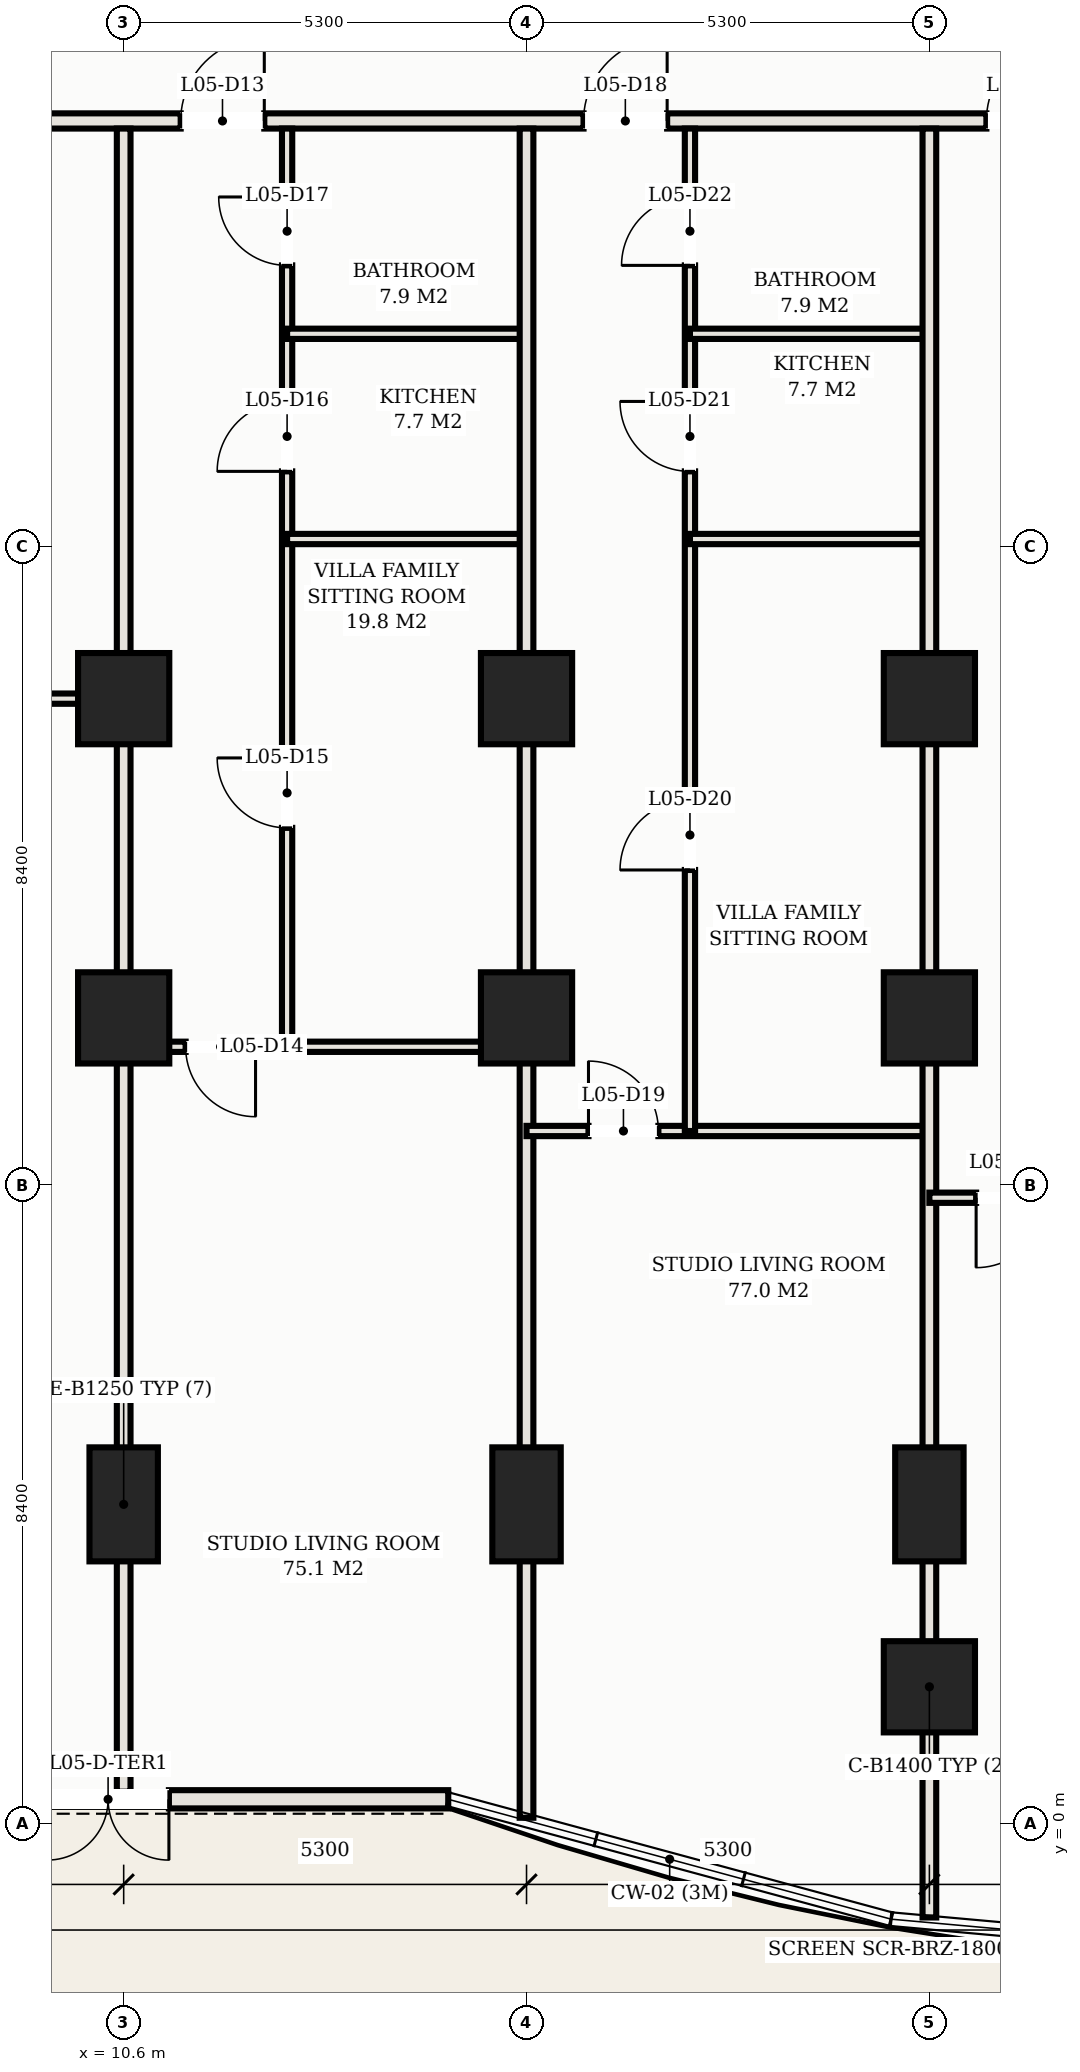
"""IFC4 building model, lengths in metres.
Left out: names, types, materials, properties, quantities, classifications, styles, units other than length and angle.
Written with IfcOpenShell. Run it as: python <this file> out.ifc"""

import sys

from ifc_helpers import new_model, si_unit, direction, frame, frame_2d, origin, origin_2d, place, context, subcontext, project, spatial, rectangle, hollow_rectangle, extrude, element, fill, save


model = new_model("IFC4")
c1 = context("Model", 3, precision=1e-05, world=origin(), true_north=direction((0.0, 1.0)))
c2 = subcontext(c1, "Body", "Model", "MODEL_VIEW")
j1 = project(units=[si_unit("LENGTHUNIT", "METRE"), si_unit("PLANEANGLEUNIT", "RADIAN")], contexts=[c1])
p1 = place(None, origin())
s1 = spatial("IfcSite", under=j1, at=p1, CompositionType="ELEMENT")
p2 = place(p1, origin())
s2 = spatial("IfcBuilding", under=s1, at=p2, CompositionType="ELEMENT")
p3 = place(p2, frame((0.0, 0.0, 24.2)))
s3 = spatial("IfcBuildingStorey", under=s2, at=p3, CompositionType="ELEMENT", Elevation=24.2)
for number, where, z_axis, x_axis in (
    (1, (10.6, 14.8, 0.0), (0.0, 0.0, 1.0), (1.0, 0.0, 0.0)),
    (2, (10.6, 10.6, 0.0), (0.0, 0.0, 1.0), (1.0, 0.0, 0.0)),
    (3, (15.9, 14.8, 0.0), (0.0, 0.0, 1.0), (1.0, 0.0, 0.0)),
    (4, (15.9, 10.6, 0.0), (0.0, 0.0, 1.0), (1.0, 0.0, 0.0)),
    (5, (21.2, 14.8, 0.0), (0.0, 0.0, 1.0), (1.0, 0.0, 0.0)),
    (6, (21.2, 10.6, 0.0), (0.0, 0.0, 1.0), (1.0, 0.0, 0.0)),
    (7, (21.2, 1.8, 0.0), (0.0, 0.0, 1.0), (1.0, 0.0, 0.0)),
):
    element("IfcColumn", number, at=place(p3, frame(where, z_axis=z_axis, x_axis=x_axis)), inside=s3, PredefinedType="COLUMN", context=c2, shape_type="SweptSolid", body=[
        extrude(hollow_rectangle(XDim=1.2, YDim=1.2, WallThickness=0.04, at=origin_2d()), origin(), (0.0, 0.0, 1.0), 3.3),
    ])
for number, where, z_axis, x_axis in (
    (8, (10.6, 4.2, 0.0), (0.0, 0.0, 1.0), (1.0, 0.0, 0.0)),
    (9, (15.9, 4.2, 0.0), (0.0, 0.0, 1.0), (1.0, 0.0, 0.0)),
    (10, (21.2, 4.2, 0.0), (0.0, 0.0, 1.0), (1.0, 0.0, 0.0)),
):
    element("IfcColumn", number, at=place(p3, frame(where, z_axis=z_axis, x_axis=x_axis)), inside=s3, PredefinedType="COLUMN", context=c2, shape_type="SweptSolid", body=[
        extrude(hollow_rectangle(XDim=0.9, YDim=1.5, WallThickness=0.036, at=origin_2d()), origin(), (0.0, 0.0, 1.0), 3.3),
    ])
p4 = place(p3, frame((5.92, 0.32, 0.0), z_axis=(0.0, 0.0, 1.0), x_axis=(1.0, 0.0, 0.0)))
e11 = element("IfcWall", 11, at=p4, inside=s3, PredefinedType="SOLIDWALL", context=c2, shape_type="SweptSolid", body=[
    extrude(rectangle(XDim=8.95, YDim=0.24, at=frame_2d((4.475, 0.0))), origin(), (0.0, 0.0, 1.0), 3.08),
])
p5 = place(p4, frame((3.675, 0.0, 0.0)))
e12 = element("IfcOpeningElement", 12, at=p5, cuts=e11, PredefinedType="OPENING", context=c2, shape_type="SweptSolid", body=[
    extrude(rectangle(XDim=1.6, YDim=2.25, at=frame_2d((0.8, 1.125))), frame((0.0, 0.13, 0.0), z_axis=(0.0, -1.0, 0.0), x_axis=(1.0, 0.0, 0.0)), (0.0, 0.0, 1.0), 0.26),
])
p6 = place(p4, frame((0.45, 0.0, 0.75)))
e13 = element("IfcOpeningElement", 13, at=p6, cuts=e11, PredefinedType="OPENING", context=c2, shape_type="SweptSolid", body=[
    extrude(rectangle(XDim=1.5, YDim=1.6, at=frame_2d((0.75, 0.8))), frame((0.0, 0.13, 0.0), z_axis=(0.0, -1.0, 0.0), x_axis=(1.0, 0.0, 0.0)), (0.0, 0.0, 1.0), 0.26),
])
p7 = place(p3, frame((0.12, 22.4, 0.0), z_axis=(0.0, 0.0, 1.0), x_axis=(1.0, 0.0, 0.0)))
e14 = element("IfcWall", 14, at=p7, inside=s3, PredefinedType="PARTITIONING", context=c2, shape_type="SweptSolid", body=[
    extrude(rectangle(XDim=52.76, YDim=0.2, at=frame_2d((26.38, 0.0))), origin(), (0.0, 0.0, 1.0), 2.57),
])
p8 = place(p7, frame((11.23, 0.0, 0.0)))
e15 = element("IfcOpeningElement", 15, at=p8, cuts=e14, PredefinedType="OPENING", context=c2, shape_type="SweptSolid", body=[
    extrude(rectangle(XDim=1.1, YDim=2.25, at=frame_2d((0.55, 1.125))), frame((0.0, 0.11, 0.0), z_axis=(0.0, -1.0, 0.0), x_axis=(1.0, 0.0, 0.0)), (0.0, 0.0, 1.0), 0.22),
])
p9 = place(p7, frame((16.53, 0.0, 0.0)))
e16 = element("IfcOpeningElement", 16, at=p9, cuts=e14, PredefinedType="OPENING", context=c2, shape_type="SweptSolid", body=[
    extrude(rectangle(XDim=1.1, YDim=2.25, at=frame_2d((0.55, 1.125))), frame((0.0, 0.11, 0.0), z_axis=(0.0, -1.0, 0.0), x_axis=(1.0, 0.0, 0.0)), (0.0, 0.0, 1.0), 0.22),
])
p10 = place(p7, frame((21.83, 0.0, 0.0)))
e17 = element("IfcOpeningElement", 17, at=p10, cuts=e14, PredefinedType="OPENING", context=c2, shape_type="SweptSolid", body=[
    extrude(rectangle(XDim=1.1, YDim=2.25, at=frame_2d((0.55, 1.125))), frame((0.0, 0.11, 0.0), z_axis=(0.0, -1.0, 0.0), x_axis=(1.0, 0.0, 0.0)), (0.0, 0.0, 1.0), 0.22),
])
p11 = place(p7, frame((27.13, 0.0, 0.0)))
e18 = element("IfcOpeningElement", 18, at=p11, cuts=e14, PredefinedType="OPENING", context=c2, shape_type="SweptSolid", body=[
    extrude(rectangle(XDim=1.1, YDim=2.25, at=frame_2d((0.55, 1.125))), frame((0.0, 0.11, 0.0), z_axis=(0.0, -1.0, 0.0), x_axis=(1.0, 0.0, 0.0)), (0.0, 0.0, 1.0), 0.22),
])
p12 = place(p7, frame((32.43, 0.0, 0.0)))
e19 = element("IfcOpeningElement", 19, at=p12, cuts=e14, PredefinedType="OPENING", context=c2, shape_type="SweptSolid", body=[
    extrude(rectangle(XDim=1.1, YDim=2.25, at=frame_2d((0.55, 1.125))), frame((0.0, 0.11, 0.0), z_axis=(0.0, -1.0, 0.0), x_axis=(1.0, 0.0, 0.0)), (0.0, 0.0, 1.0), 0.22),
])
p13 = place(p7, frame((37.73, 0.0, 0.0)))
e20 = element("IfcOpeningElement", 20, at=p13, cuts=e14, PredefinedType="OPENING", context=c2, shape_type="SweptSolid", body=[
    extrude(rectangle(XDim=1.1, YDim=2.25, at=frame_2d((0.55, 1.125))), frame((0.0, 0.11, 0.0), z_axis=(0.0, -1.0, 0.0), x_axis=(1.0, 0.0, 0.0)), (0.0, 0.0, 1.0), 0.22),
])
p14 = place(p7, frame((4.735, 0.0, 0.0)))
e21 = element("IfcOpeningElement", 21, at=p14, cuts=e14, PredefinedType="OPENING", context=c2, shape_type="SweptSolid", body=[
    extrude(rectangle(XDim=0.92, YDim=2.15, at=frame_2d((0.46, 1.075))), frame((0.0, 0.11, 0.0), z_axis=(0.0, -1.0, 0.0), x_axis=(1.0, 0.0, 0.0)), (0.0, 0.0, 1.0), 0.22),
])
p15 = place(p7, frame((47.105, 0.0, 0.0)))
e22 = element("IfcOpeningElement", 22, at=p15, cuts=e14, PredefinedType="OPENING", context=c2, shape_type="SweptSolid", body=[
    extrude(rectangle(XDim=0.92, YDim=2.15, at=frame_2d((0.46, 1.075))), frame((0.0, 0.11, 0.0), z_axis=(0.0, -1.0, 0.0), x_axis=(1.0, 0.0, 0.0)), (0.0, 0.0, 1.0), 0.22),
])
p16 = place(p3, frame((10.6, 0.42, 0.0), z_axis=(0.0, 0.0, 1.0), x_axis=(0.0, 1.0, 0.0)))
e23 = element("IfcWall", 23, at=p16, inside=s3, PredefinedType="PARTITIONING", context=c2, shape_type="SweptSolid", body=[
    extrude(rectangle(XDim=21.88, YDim=0.18, at=frame_2d((10.94, 0.0))), origin(), (0.0, 0.0, 1.0), 2.275),
])
p17 = place(p3, frame((10.6, 10.22, 0.0), z_axis=(0.0, 0.0, 1.0), x_axis=(1.0, 0.0, 0.0)))
e24 = element("IfcWall", 24, at=p17, inside=s3, PredefinedType="PARTITIONING", context=c2, shape_type="SweptSolid", body=[
    extrude(rectangle(XDim=5.3, YDim=0.135, at=frame_2d((2.65, 0.0))), origin(), (0.0, 0.0, 1.0), 2.57),
])
p18 = place(p17, frame((0.815, 0.0, 0.0)))
e25 = element("IfcOpeningElement", 25, at=p18, cuts=e24, PredefinedType="OPENING", context=c2, shape_type="SweptSolid", body=[
    extrude(rectangle(XDim=0.92, YDim=2.15, at=frame_2d((0.46, 1.075))), frame((0.0, 0.078, 0.0), z_axis=(0.0, -1.0, 0.0), x_axis=(1.0, 0.0, 0.0)), (0.0, 0.0, 1.0), 0.155),
])
p19 = place(p3, frame((12.75, 10.22, 0.0), z_axis=(0.0, 0.0, 1.0), x_axis=(0.0, 1.0, 0.0)))
e26 = element("IfcWall", 26, at=p19, inside=s3, PredefinedType="PARTITIONING", context=c2, shape_type="SweptSolid", body=[
    extrude(rectangle(XDim=12.08, YDim=0.135, at=frame_2d((6.04, 0.0))), origin(), (0.0, 0.0, 1.0), 2.57),
])
p20 = place(p19, frame((2.88, 0.0, 0.0)))
e27 = element("IfcOpeningElement", 27, at=p20, cuts=e26, PredefinedType="OPENING", context=c2, shape_type="SweptSolid", body=[
    extrude(rectangle(XDim=0.92, YDim=2.15, at=frame_2d((0.46, 1.075))), frame((0.0, 0.078, 0.0), z_axis=(0.0, -1.0, 0.0), x_axis=(1.0, 0.0, 0.0)), (0.0, 0.0, 1.0), 0.155),
])
p21 = place(p19, frame((7.57, 0.0, 0.0)))
e28 = element("IfcOpeningElement", 28, at=p21, cuts=e26, PredefinedType="OPENING", context=c2, shape_type="SweptSolid", body=[
    extrude(rectangle(XDim=0.92, YDim=2.15, at=frame_2d((0.46, 1.075))), frame((0.0, 0.078, 0.0), z_axis=(0.0, -1.0, 0.0), x_axis=(1.0, 0.0, 0.0)), (0.0, 0.0, 1.0), 0.155),
])
p22 = place(p19, frame((10.28, 0.0, 0.0)))
e29 = element("IfcOpeningElement", 29, at=p22, cuts=e26, PredefinedType="OPENING", context=c2, shape_type="SweptSolid", body=[
    extrude(rectangle(XDim=0.9, YDim=2.15, at=frame_2d((0.45, 1.075))), frame((0.0, 0.078, 0.0), z_axis=(0.0, -1.0, 0.0), x_axis=(1.0, 0.0, 0.0)), (0.0, 0.0, 1.0), 0.155),
])
for number, where, z_axis, x_axis in (
    (30, (12.75, 16.9, 0.0), (0.0, 0.0, 1.0), (1.0, 0.0, 0.0)),
    (31, (12.75, 19.6, 0.0), (0.0, 0.0, 1.0), (1.0, 0.0, 0.0)),
):
    element("IfcWall", number, at=place(p3, frame(where, z_axis=z_axis, x_axis=x_axis)), inside=s3, PredefinedType="PARTITIONING", context=c2, shape_type="SweptSolid", body=[
        extrude(rectangle(XDim=3.15, YDim=0.135, at=frame_2d((1.575, 0.0))), origin(), (0.0, 0.0, 1.0), 2.57),
    ])
p23 = place(p3, frame((15.9, 0.077, 0.0), z_axis=(0.0, 0.0, 1.0), x_axis=(0.0, 1.0, 0.0)))
e32 = element("IfcWall", 32, at=p23, inside=s3, PredefinedType="PARTITIONING", context=c2, shape_type="SweptSolid", body=[
    extrude(rectangle(XDim=22.223, YDim=0.18, at=frame_2d((11.112, 0.0))), origin(), (0.0, 0.0, 1.0), 2.275),
])
p24 = place(p3, frame((15.9, 9.112, 0.0), z_axis=(0.0, 0.0, 1.0), x_axis=(1.0, 0.0, 0.0)))
e33 = element("IfcWall", 33, at=p24, inside=s3, PredefinedType="PARTITIONING", context=c2, shape_type="SweptSolid", body=[
    extrude(rectangle(XDim=5.3, YDim=0.135, at=frame_2d((2.65, 0.0))), origin(), (0.0, 0.0, 1.0), 2.57),
])
p25 = place(p24, frame((0.815, 0.0, 0.0)))
e34 = element("IfcOpeningElement", 34, at=p25, cuts=e33, PredefinedType="OPENING", context=c2, shape_type="SweptSolid", body=[
    extrude(rectangle(XDim=0.92, YDim=2.15, at=frame_2d((0.46, 1.075))), frame((0.0, 0.078, 0.0), z_axis=(0.0, -1.0, 0.0), x_axis=(1.0, 0.0, 0.0)), (0.0, 0.0, 1.0), 0.155),
])
p26 = place(p3, frame((18.05, 9.112, 0.0), z_axis=(0.0, 0.0, 1.0), x_axis=(0.0, 1.0, 0.0)))
e35 = element("IfcWall", 35, at=p26, inside=s3, PredefinedType="PARTITIONING", context=c2, shape_type="SweptSolid", body=[
    extrude(rectangle(XDim=13.188, YDim=0.135, at=frame_2d((6.594, 0.0))), origin(), (0.0, 0.0, 1.0), 2.57),
])
p27 = place(p26, frame((3.434, 0.0, 0.0)))
e36 = element("IfcOpeningElement", 36, at=p27, cuts=e35, PredefinedType="OPENING", context=c2, shape_type="SweptSolid", body=[
    extrude(rectangle(XDim=0.92, YDim=2.15, at=frame_2d((0.46, 1.075))), frame((0.0, 0.078, 0.0), z_axis=(0.0, -1.0, 0.0), x_axis=(1.0, 0.0, 0.0)), (0.0, 0.0, 1.0), 0.155),
])
p28 = place(p26, frame((8.678, 0.0, 0.0)))
e37 = element("IfcOpeningElement", 37, at=p28, cuts=e35, PredefinedType="OPENING", context=c2, shape_type="SweptSolid", body=[
    extrude(rectangle(XDim=0.92, YDim=2.15, at=frame_2d((0.46, 1.075))), frame((0.0, 0.078, 0.0), z_axis=(0.0, -1.0, 0.0), x_axis=(1.0, 0.0, 0.0)), (0.0, 0.0, 1.0), 0.155),
])
p29 = place(p26, frame((11.388, 0.0, 0.0)))
e38 = element("IfcOpeningElement", 38, at=p29, cuts=e35, PredefinedType="OPENING", context=c2, shape_type="SweptSolid", body=[
    extrude(rectangle(XDim=0.9, YDim=2.15, at=frame_2d((0.45, 1.075))), frame((0.0, 0.078, 0.0), z_axis=(0.0, -1.0, 0.0), x_axis=(1.0, 0.0, 0.0)), (0.0, 0.0, 1.0), 0.155),
])
for number, where, z_axis, x_axis in (
    (39, (18.05, 16.9, 0.0), (0.0, 0.0, 1.0), (1.0, 0.0, 0.0)),
    (40, (18.05, 19.6, 0.0), (0.0, 0.0, 1.0), (1.0, 0.0, 0.0)),
):
    element("IfcWall", number, at=place(p3, frame(where, z_axis=z_axis, x_axis=x_axis)), inside=s3, PredefinedType="PARTITIONING", context=c2, shape_type="SweptSolid", body=[
        extrude(rectangle(XDim=3.15, YDim=0.135, at=frame_2d((1.575, 0.0))), origin(), (0.0, 0.0, 1.0), 2.57),
    ])
p30 = place(p3, frame((21.2, -1.235, 0.0), z_axis=(0.0, 0.0, 1.0), x_axis=(0.0, 1.0, 0.0)))
e41 = element("IfcWall", 41, at=p30, inside=s3, PredefinedType="PARTITIONING", context=c2, shape_type="SweptSolid", body=[
    extrude(rectangle(XDim=23.535, YDim=0.18, at=frame_2d((11.768, 0.0))), origin(), (0.0, 0.0, 1.0), 2.275),
])
p31 = place(p3, frame((21.2, 8.234, 0.0), z_axis=(0.0, 0.0, 1.0), x_axis=(1.0, 0.0, 0.0)))
e42 = element("IfcWall", 42, at=p31, inside=s3, PredefinedType="PARTITIONING", context=c2, shape_type="SweptSolid", body=[
    extrude(rectangle(XDim=5.3, YDim=0.135, at=frame_2d((2.65, 0.0))), origin(), (0.0, 0.0, 1.0), 2.57),
])
p32 = place(p31, frame((0.615, 0.0, 0.0)))
e43 = element("IfcOpeningElement", 43, at=p32, cuts=e42, PredefinedType="OPENING", context=c2, shape_type="SweptSolid", body=[
    extrude(rectangle(XDim=0.92, YDim=2.15, at=frame_2d((0.46, 1.075))), frame((0.0, 0.078, 0.0), z_axis=(0.0, -1.0, 0.0), x_axis=(1.0, 0.0, 0.0)), (0.0, 0.0, 1.0), 0.155),
])
p33 = place(p3, frame((0.22, 14.8, 0.0), z_axis=(0.0, 0.0, 1.0), x_axis=(1.0, 0.0, 0.0)))
e44 = element("IfcWall", 44, at=p33, inside=s3, PredefinedType="PARTITIONING", context=c2, shape_type="SweptSolid", body=[
    extrude(rectangle(XDim=10.38, YDim=0.135, at=frame_2d((5.19, 0.0))), origin(), (0.0, 0.0, 1.0), 2.275),
])
p34 = place(p33, frame((6.43, 0.0, 0.0)))
e45 = element("IfcOpeningElement", 45, at=p34, cuts=e44, PredefinedType="OPENING", context=c2, shape_type="SweptSolid", body=[
    extrude(rectangle(XDim=0.92, YDim=2.15, at=frame_2d((0.46, 1.075))), frame((0.0, 0.078, 0.0), z_axis=(0.0, -1.0, 0.0), x_axis=(1.0, 0.0, 0.0)), (0.0, 0.0, 1.0), 0.155),
])
p35 = place(p5, frame((1.6, 0.0, 0.0), z_axis=(0.0, 0.0, 1.0), x_axis=(-1.0, 0.0, 0.0)))
e46 = element("IfcDoor", 46, at=p35, inside=s3, OperationType="DOUBLE_DOOR_SINGLE_SWING", PredefinedType="DOOR", context=c2, shape_type="SweptSolid", body=[
    extrude(rectangle(XDim=1.6, YDim=2.25, at=frame_2d((0.8, 1.125))), frame((0.0, 0.025, 0.0), z_axis=(0.0, -1.0, 0.0), x_axis=(1.0, 0.0, 0.0)), (0.0, 0.0, 1.0), 0.05),
])
fill(e12, e46)
p36 = place(p8, origin())
e47 = element("IfcDoor", 47, at=p36, inside=s3, OperationType="SINGLE_SWING_RIGHT", PredefinedType="DOOR", context=c2, shape_type="SweptSolid", body=[
    extrude(rectangle(XDim=1.1, YDim=2.25, at=frame_2d((0.55, 1.125))), frame((0.0, 0.025, 0.0), z_axis=(0.0, -1.0, 0.0), x_axis=(1.0, 0.0, 0.0)), (0.0, 0.0, 1.0), 0.05),
])
fill(e15, e47)
p37 = place(p18, frame((0.92, 0.0, 0.0), z_axis=(0.0, 0.0, 1.0), x_axis=(-1.0, 0.0, 0.0)))
e48 = element("IfcDoor", 48, at=p37, inside=s3, OperationType="SINGLE_SWING_LEFT", PredefinedType="DOOR", context=c2, shape_type="SweptSolid", body=[
    extrude(rectangle(XDim=0.92, YDim=2.15, at=frame_2d((0.46, 1.075))), frame((0.0, 0.025, 0.0), z_axis=(0.0, -1.0, 0.0), x_axis=(1.0, 0.0, 0.0)), (0.0, 0.0, 1.0), 0.05),
])
fill(e25, e48)
p38 = place(p20, origin())
e49 = element("IfcDoor", 49, at=p38, inside=s3, OperationType="SINGLE_SWING_RIGHT", PredefinedType="DOOR", context=c2, shape_type="SweptSolid", body=[
    extrude(rectangle(XDim=0.92, YDim=2.15, at=frame_2d((0.46, 1.075))), frame((0.0, 0.025, 0.0), z_axis=(0.0, -1.0, 0.0), x_axis=(1.0, 0.0, 0.0)), (0.0, 0.0, 1.0), 0.05),
])
fill(e27, e49)
p39 = place(p21, origin())
e50 = element("IfcDoor", 50, at=p39, inside=s3, OperationType="SINGLE_SWING_LEFT", PredefinedType="DOOR", context=c2, shape_type="SweptSolid", body=[
    extrude(rectangle(XDim=0.92, YDim=2.15, at=frame_2d((0.46, 1.075))), frame((0.0, 0.025, 0.0), z_axis=(0.0, -1.0, 0.0), x_axis=(1.0, 0.0, 0.0)), (0.0, 0.0, 1.0), 0.05),
])
fill(e28, e50)
p40 = place(p22, origin())
e51 = element("IfcDoor", 51, at=p40, inside=s3, OperationType="SINGLE_SWING_RIGHT", PredefinedType="DOOR", context=c2, shape_type="SweptSolid", body=[
    extrude(rectangle(XDim=0.9, YDim=2.15, at=frame_2d((0.45, 1.075))), frame((0.0, 0.025, 0.0), z_axis=(0.0, -1.0, 0.0), x_axis=(1.0, 0.0, 0.0)), (0.0, 0.0, 1.0), 0.05),
])
fill(e29, e51)
p41 = place(p9, origin())
e52 = element("IfcDoor", 52, at=p41, inside=s3, OperationType="SINGLE_SWING_RIGHT", PredefinedType="DOOR", context=c2, shape_type="SweptSolid", body=[
    extrude(rectangle(XDim=1.1, YDim=2.25, at=frame_2d((0.55, 1.125))), frame((0.0, 0.025, 0.0), z_axis=(0.0, -1.0, 0.0), x_axis=(1.0, 0.0, 0.0)), (0.0, 0.0, 1.0), 0.05),
])
fill(e16, e52)
p42 = place(p25, origin())
e53 = element("IfcDoor", 53, at=p42, inside=s3, OperationType="SINGLE_SWING_LEFT", PredefinedType="DOOR", context=c2, shape_type="SweptSolid", body=[
    extrude(rectangle(XDim=0.92, YDim=2.15, at=frame_2d((0.46, 1.075))), frame((0.0, 0.025, 0.0), z_axis=(0.0, -1.0, 0.0), x_axis=(1.0, 0.0, 0.0)), (0.0, 0.0, 1.0), 0.05),
])
fill(e34, e53)
p43 = place(p27, origin())
e54 = element("IfcDoor", 54, at=p43, inside=s3, OperationType="SINGLE_SWING_LEFT", PredefinedType="DOOR", context=c2, shape_type="SweptSolid", body=[
    extrude(rectangle(XDim=0.92, YDim=2.15, at=frame_2d((0.46, 1.075))), frame((0.0, 0.025, 0.0), z_axis=(0.0, -1.0, 0.0), x_axis=(1.0, 0.0, 0.0)), (0.0, 0.0, 1.0), 0.05),
])
fill(e36, e54)
p44 = place(p28, origin())
e55 = element("IfcDoor", 55, at=p44, inside=s3, OperationType="SINGLE_SWING_RIGHT", PredefinedType="DOOR", context=c2, shape_type="SweptSolid", body=[
    extrude(rectangle(XDim=0.92, YDim=2.15, at=frame_2d((0.46, 1.075))), frame((0.0, 0.025, 0.0), z_axis=(0.0, -1.0, 0.0), x_axis=(1.0, 0.0, 0.0)), (0.0, 0.0, 1.0), 0.05),
])
fill(e37, e55)
p45 = place(p29, origin())
e56 = element("IfcDoor", 56, at=p45, inside=s3, OperationType="SINGLE_SWING_LEFT", PredefinedType="DOOR", context=c2, shape_type="SweptSolid", body=[
    extrude(rectangle(XDim=0.9, YDim=2.15, at=frame_2d((0.45, 1.075))), frame((0.0, 0.025, 0.0), z_axis=(0.0, -1.0, 0.0), x_axis=(1.0, 0.0, 0.0)), (0.0, 0.0, 1.0), 0.05),
])
fill(e38, e56)
p46 = place(p10, origin())
e57 = element("IfcDoor", 57, at=p46, inside=s3, OperationType="SINGLE_SWING_RIGHT", PredefinedType="DOOR", context=c2, shape_type="SweptSolid", body=[
    extrude(rectangle(XDim=1.1, YDim=2.25, at=frame_2d((0.55, 1.125))), frame((0.0, 0.025, 0.0), z_axis=(0.0, -1.0, 0.0), x_axis=(1.0, 0.0, 0.0)), (0.0, 0.0, 1.0), 0.05),
])
fill(e17, e57)
p47 = place(p32, frame((0.92, 0.0, 0.0), z_axis=(0.0, 0.0, 1.0), x_axis=(-1.0, 0.0, 0.0)))
e58 = element("IfcDoor", 58, at=p47, inside=s3, OperationType="SINGLE_SWING_RIGHT", PredefinedType="DOOR", context=c2, shape_type="SweptSolid", body=[
    extrude(rectangle(XDim=0.92, YDim=2.15, at=frame_2d((0.46, 1.075))), frame((0.0, 0.025, 0.0), z_axis=(0.0, -1.0, 0.0), x_axis=(1.0, 0.0, 0.0)), (0.0, 0.0, 1.0), 0.05),
])
fill(e43, e58)
save(model, sys.argv[1])
